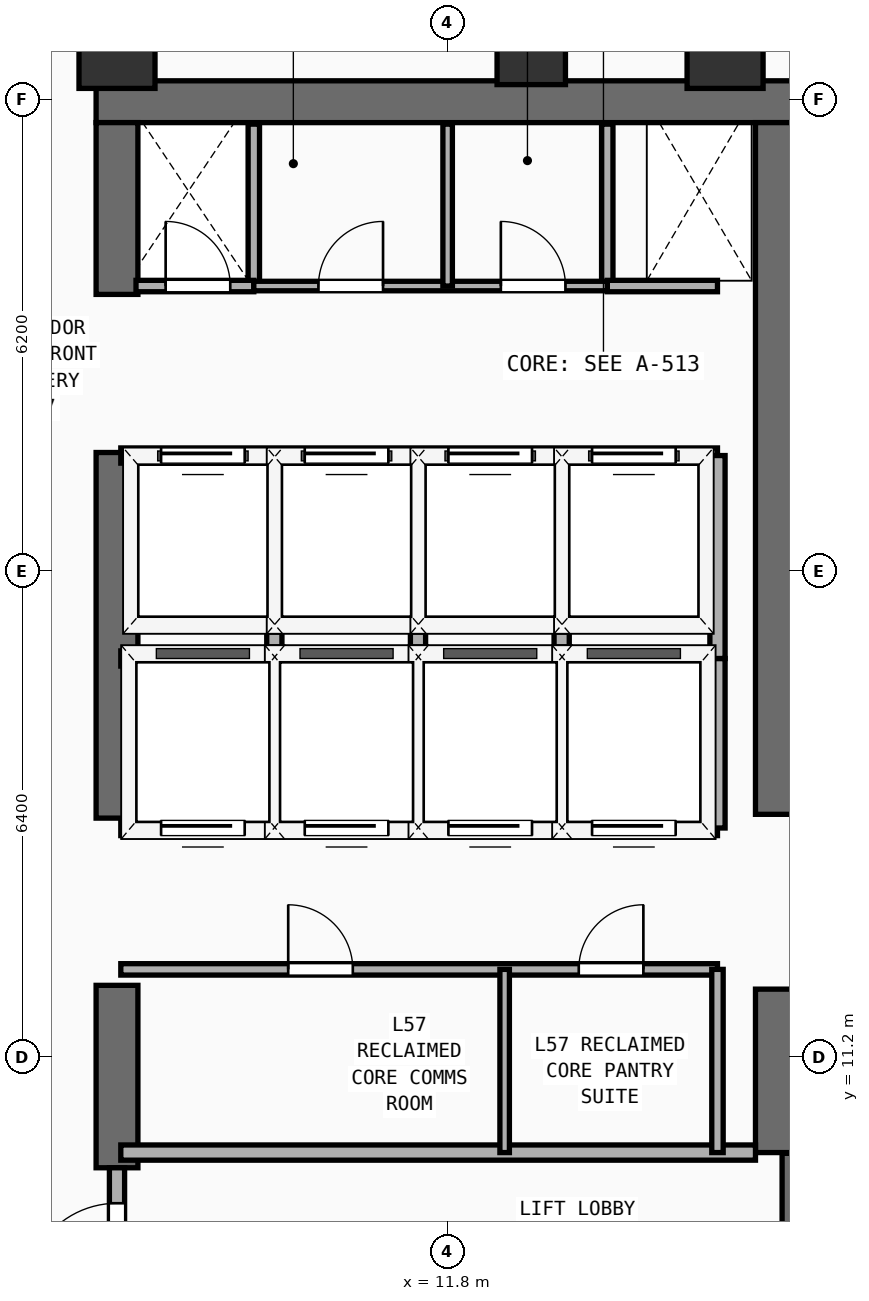
"""IFC4 building model, lengths in metres.
Left out: names, types, materials, properties, quantities, classifications, styles, units other than length and angle.
Written with IfcOpenShell. Run it as: python <this file> out.ifc"""

import sys

from ifc_helpers import new_model, si_unit, direction, frame, frame_2d, origin, origin_2d, place, context, subcontext, project, spatial, rectangle, extrude, element, fill, save


model = new_model("IFC4")
c1 = context("Model", 3, precision=1e-05, world=origin(), true_north=direction((0.0, 1.0)))
c2 = subcontext(c1, "Body", "Model", "MODEL_VIEW")
j1 = project(units=[si_unit("LENGTHUNIT", "METRE"), si_unit("PLANEANGLEUNIT", "RADIAN")], contexts=[c1])
p1 = place(None, origin())
s1 = spatial("IfcSite", under=j1, at=p1, CompositionType="ELEMENT")
p2 = place(p1, origin())
s2 = spatial("IfcBuilding", under=s1, at=p2, CompositionType="ELEMENT")
p3 = place(p2, frame((0.0, 0.0, 223.5)))
s3 = spatial("IfcBuildingStorey", under=s2, at=p3, CompositionType="ELEMENT", Elevation=223.5)
p4 = place(p3, frame((7.175, 23.775, 0.0), z_axis=(0.0, 0.0, 1.0), x_axis=(1.0, 0.0, 0.0)))
e1 = element("IfcWall", 1, at=p4, inside=s3, PredefinedType="SHEAR", context=c2, shape_type="SweptSolid", body=[
    extrude(rectangle(XDim=13.9, YDim=0.55, at=frame_2d((6.95, 0.0))), origin(), (0.0, 0.0, 1.0), 3.56),
])
p5 = place(p3, frame((7.45, 9.75, 0.0), z_axis=(0.0, 0.0, 1.0), x_axis=(0.0, 1.0, 0.0)))
e2 = element("IfcWall", 2, at=p5, inside=s3, PredefinedType="SHEAR", context=c2, shape_type="SweptSolid", body=[
    extrude(rectangle(XDim=2.4, YDim=0.55, at=frame_2d((1.2, 0.0))), origin(), (0.0, 0.0, 1.0), 3.56),
])
p6 = place(p3, frame((7.45, 14.35, 0.0), z_axis=(0.0, 0.0, 1.0), x_axis=(0.0, 1.0, 0.0)))
e3 = element("IfcWall", 3, at=p6, inside=s3, PredefinedType="SHEAR", context=c2, shape_type="SweptSolid", body=[
    extrude(rectangle(XDim=4.81, YDim=0.55, at=frame_2d((2.405, 0.0))), origin(), (0.0, 0.0, 1.0), 3.56),
])
p7 = place(p3, frame((7.45, 21.24, 0.0), z_axis=(0.0, 0.0, 1.0), x_axis=(0.0, 1.0, 0.0)))
e4 = element("IfcWall", 4, at=p7, inside=s3, PredefinedType="SHEAR", context=c2, shape_type="SweptSolid", body=[
    extrude(rectangle(XDim=2.26, YDim=0.55, at=frame_2d((1.13, 0.0))), origin(), (0.0, 0.0, 1.0), 3.56),
])
p8 = place(p3, frame((16.125, 9.95, 0.0), z_axis=(0.0, 0.0, 1.0), x_axis=(0.0, 1.0, 0.0)))
e5 = element("IfcWall", 5, at=p8, inside=s3, PredefinedType="SHEAR", context=c2, shape_type="SweptSolid", body=[
    extrude(rectangle(XDim=2.15, YDim=0.55, at=frame_2d((1.075, 0.0))), origin(), (0.0, 0.0, 1.0), 3.56),
])
p9 = place(p3, frame((16.125, 14.4, 0.0), z_axis=(0.0, 0.0, 1.0), x_axis=(0.0, 1.0, 0.0)))
e6 = element("IfcWall", 6, at=p9, inside=s3, PredefinedType="SHEAR", context=c2, shape_type="SweptSolid", body=[
    extrude(rectangle(XDim=9.1, YDim=0.55, at=frame_2d((4.55, 0.0))), origin(), (0.0, 0.0, 1.0), 3.56),
])
for number, where, z_axis, x_axis in (
    (7, (7.45, 24.45, 0.0), (0.0, 0.0, 1.0), (1.0, 0.0, 0.0)),
    (8, (15.45, 24.45, 0.0), (0.0, 0.0, 1.0), (1.0, 0.0, 0.0)),
):
    element("IfcColumn", number, at=place(p3, frame(where, z_axis=z_axis, x_axis=x_axis)), inside=s3, PredefinedType="COLUMN", context=c2, shape_type="SweptSolid", body=[
        extrude(rectangle(XDim=1.0, YDim=1.0, at=origin_2d()), origin(), (0.0, 0.0, 1.0), 3.56),
    ])
p10 = place(p3, frame((12.9, 24.45, 0.0), z_axis=(0.0, 0.0, 1.0), x_axis=(1.0, 0.0, 0.0)))
e9 = element("IfcColumn", 9, at=p10, inside=s3, PredefinedType="COLUMN", context=c2, shape_type="SweptSolid", body=[
    extrude(rectangle(XDim=0.9, YDim=0.9, at=origin_2d()), origin(), (0.0, 0.0, 1.0), 3.56),
])
p11 = place(p3, frame((16.3, 7.36, 0.0), z_axis=(0.0, 0.0, 1.0), x_axis=(0.0, 1.0, 0.0)))
e10 = element("IfcWall", 10, at=p11, inside=s3, PredefinedType="SHEAR", context=c2, shape_type="SweptSolid", body=[
    extrude(rectangle(XDim=2.58, YDim=0.2, at=frame_2d((1.29, 0.0))), origin(), (0.0, 0.0, 1.0), 3.56),
])
p12 = place(p3, frame((7.5, 9.95, 0.0), z_axis=(0.0, 0.0, 1.0), x_axis=(1.0, 0.0, 0.0)))
e11 = element("IfcWall", 11, at=p12, inside=s3, PredefinedType="PARTITIONING", context=c2, shape_type="SweptSolid", body=[
    extrude(rectangle(XDim=8.35, YDim=0.2, at=frame_2d((4.175, 0.0))), origin(), (0.0, 0.0, 1.0), 3.56),
])
p13 = place(p3, frame((7.45, 7.45, 0.0), z_axis=(0.0, 0.0, 1.0), x_axis=(0.0, 1.0, 0.0)))
e12 = element("IfcWall", 12, at=p13, inside=s3, PredefinedType="PARTITIONING", context=c2, shape_type="SweptSolid", body=[
    extrude(rectangle(XDim=2.3, YDim=0.2, at=frame_2d((1.15, 0.0))), origin(), (0.0, 0.0, 1.0), 2.54),
])
p14 = place(p13, frame((0.633, 0.0, 0.0)))
e13 = element("IfcOpeningElement", 13, at=p14, cuts=e12, PredefinedType="OPENING", context=c2, shape_type="SweptSolid", body=[
    extrude(rectangle(XDim=1.2, YDim=2.25, at=frame_2d((0.6, 1.125))), frame((0.0, 0.11, 0.0), z_axis=(0.0, -1.0, 0.0), x_axis=(1.0, 0.0, 0.0)), (0.0, 0.0, 1.0), 0.22),
])
p15 = place(p3, frame((7.5, 12.36, 0.0), z_axis=(0.0, 0.0, 1.0), x_axis=(1.0, 0.0, 0.0)))
e14 = element("IfcWall", 14, at=p15, inside=s3, PredefinedType="PARTITIONING", context=c2, shape_type="SweptSolid", body=[
    extrude(rectangle(XDim=7.85, YDim=0.15, at=frame_2d((3.925, 0.0))), origin(), (0.0, 0.0, 1.0), 3.56),
])
p16 = place(p15, frame((2.202, 0.0, 0.0)))
e15 = element("IfcOpeningElement", 15, at=p16, cuts=e14, PredefinedType="OPENING", context=c2, shape_type="SweptSolid", body=[
    extrude(rectangle(XDim=0.85, YDim=2.15, at=frame_2d((0.425, 1.075))), frame((0.0, 0.085, 0.0), z_axis=(0.0, -1.0, 0.0), x_axis=(1.0, 0.0, 0.0)), (0.0, 0.0, 1.0), 0.17),
])
p17 = place(p15, frame((6.025, 0.0, 0.0)))
e16 = element("IfcOpeningElement", 16, at=p17, cuts=e14, PredefinedType="OPENING", context=c2, shape_type="SweptSolid", body=[
    extrude(rectangle(XDim=0.85, YDim=2.15, at=frame_2d((0.425, 1.075))), frame((0.0, 0.085, 0.0), z_axis=(0.0, -1.0, 0.0), x_axis=(1.0, 0.0, 0.0)), (0.0, 0.0, 1.0), 0.17),
])
p18 = place(p3, frame((15.35, 9.95, 0.0), z_axis=(0.0, 0.0, 1.0), x_axis=(0.0, 1.0, 0.0)))
e17 = element("IfcWall", 17, at=p18, inside=s3, PredefinedType="PARTITIONING", context=c2, shape_type="SweptSolid", body=[
    extrude(rectangle(XDim=2.41, YDim=0.15, at=frame_2d((1.205, 0.0))), origin(), (0.0, 0.0, 1.0), 3.56),
])
p19 = place(p3, frame((12.55, 9.95, 0.0), z_axis=(0.0, 0.0, 1.0), x_axis=(0.0, 1.0, 0.0)))
e18 = element("IfcWall", 18, at=p19, inside=s3, PredefinedType="PARTITIONING", context=c2, shape_type="SweptSolid", body=[
    extrude(rectangle(XDim=2.41, YDim=0.125, at=frame_2d((1.205, 0.0))), origin(), (0.0, 0.0, 1.0), 3.56),
])
p20 = place(p3, frame((7.5, 14.22, 0.0), z_axis=(0.0, 0.0, 1.0), x_axis=(1.0, 0.0, 0.0)))
e19 = element("IfcWall", 19, at=p20, inside=s3, PredefinedType="PARTITIONING", context=c2, shape_type="SweptSolid", body=[
    extrude(rectangle(XDim=7.85, YDim=0.2, at=frame_2d((3.925, 0.0))), origin(), (0.0, 0.0, 1.0), 3.56),
])
p21 = place(p20, frame((0.53, 0.0, 0.0)))
e20 = element("IfcOpeningElement", 20, at=p21, cuts=e19, PredefinedType="OPENING", context=c2, shape_type="SweptSolid", body=[
    extrude(rectangle(XDim=1.1, YDim=2.2, at=frame_2d((0.55, 1.1))), frame((0.0, 0.11, 0.0), z_axis=(0.0, -1.0, 0.0), x_axis=(1.0, 0.0, 0.0)), (0.0, 0.0, 1.0), 0.22),
])
p22 = place(p20, frame((2.42, 0.0, 0.0)))
e21 = element("IfcOpeningElement", 21, at=p22, cuts=e19, PredefinedType="OPENING", context=c2, shape_type="SweptSolid", body=[
    extrude(rectangle(XDim=1.1, YDim=2.2, at=frame_2d((0.55, 1.1))), frame((0.0, 0.11, 0.0), z_axis=(0.0, -1.0, 0.0), x_axis=(1.0, 0.0, 0.0)), (0.0, 0.0, 1.0), 0.22),
])
p23 = place(p20, frame((4.31, 0.0, 0.0)))
e22 = element("IfcOpeningElement", 22, at=p23, cuts=e19, PredefinedType="OPENING", context=c2, shape_type="SweptSolid", body=[
    extrude(rectangle(XDim=1.1, YDim=2.2, at=frame_2d((0.55, 1.1))), frame((0.0, 0.11, 0.0), z_axis=(0.0, -1.0, 0.0), x_axis=(1.0, 0.0, 0.0)), (0.0, 0.0, 1.0), 0.22),
])
p24 = place(p20, frame((6.2, 0.0, 0.0)))
e23 = element("IfcOpeningElement", 23, at=p24, cuts=e19, PredefinedType="OPENING", context=c2, shape_type="SweptSolid", body=[
    extrude(rectangle(XDim=1.1, YDim=2.2, at=frame_2d((0.55, 1.1))), frame((0.0, 0.11, 0.0), z_axis=(0.0, -1.0, 0.0), x_axis=(1.0, 0.0, 0.0)), (0.0, 0.0, 1.0), 0.22),
])
p25 = place(p3, frame((7.5, 16.45, 0.0), z_axis=(0.0, 0.0, 1.0), x_axis=(1.0, 0.0, 0.0)))
e24 = element("IfcWall", 24, at=p25, inside=s3, PredefinedType="PARTITIONING", context=c2, shape_type="SweptSolid", body=[
    extrude(rectangle(XDim=7.85, YDim=0.2, at=frame_2d((3.925, 0.0))), origin(), (0.0, 0.0, 1.0), 3.56),
])
for number, where, z_axis, x_axis in (
    (25, (15.35, 14.22, 0.0), (0.0, 0.0, 1.0), (0.0, 1.0, 0.0)),
    (26, (9.52, 14.22, 0.0), (0.0, 0.0, 1.0), (0.0, 1.0, 0.0)),
    (27, (11.41, 14.22, 0.0), (0.0, 0.0, 1.0), (0.0, 1.0, 0.0)),
    (28, (13.3, 14.22, 0.0), (0.0, 0.0, 1.0), (0.0, 1.0, 0.0)),
):
    element("IfcWall", number, at=place(p3, frame(where, z_axis=z_axis, x_axis=x_axis)), inside=s3, PredefinedType="PARTITIONING", context=c2, shape_type="SweptSolid", body=[
        extrude(rectangle(XDim=2.23, YDim=0.2, at=frame_2d((1.115, 0.0))), origin(), (0.0, 0.0, 1.0), 3.56),
    ])
p26 = place(p3, frame((7.5, 19.12, 0.0), z_axis=(0.0, 0.0, 1.0), x_axis=(1.0, 0.0, 0.0)))
e29 = element("IfcWall", 29, at=p26, inside=s3, PredefinedType="PARTITIONING", context=c2, shape_type="SweptSolid", body=[
    extrude(rectangle(XDim=7.85, YDim=0.2, at=frame_2d((3.925, 0.0))), origin(), (0.0, 0.0, 1.0), 3.56),
])
p27 = place(p26, frame((0.53, 0.0, 0.0)))
e30 = element("IfcOpeningElement", 30, at=p27, cuts=e29, PredefinedType="OPENING", context=c2, shape_type="SweptSolid", body=[
    extrude(rectangle(XDim=1.1, YDim=2.2, at=frame_2d((0.55, 1.1))), frame((0.0, 0.11, 0.0), z_axis=(0.0, -1.0, 0.0), x_axis=(1.0, 0.0, 0.0)), (0.0, 0.0, 1.0), 0.22),
])
p28 = place(p26, frame((2.42, 0.0, 0.0)))
e31 = element("IfcOpeningElement", 31, at=p28, cuts=e29, PredefinedType="OPENING", context=c2, shape_type="SweptSolid", body=[
    extrude(rectangle(XDim=1.1, YDim=2.2, at=frame_2d((0.55, 1.1))), frame((0.0, 0.11, 0.0), z_axis=(0.0, -1.0, 0.0), x_axis=(1.0, 0.0, 0.0)), (0.0, 0.0, 1.0), 0.22),
])
p29 = place(p26, frame((4.31, 0.0, 0.0)))
e32 = element("IfcOpeningElement", 32, at=p29, cuts=e29, PredefinedType="OPENING", context=c2, shape_type="SweptSolid", body=[
    extrude(rectangle(XDim=1.1, YDim=2.2, at=frame_2d((0.55, 1.1))), frame((0.0, 0.11, 0.0), z_axis=(0.0, -1.0, 0.0), x_axis=(1.0, 0.0, 0.0)), (0.0, 0.0, 1.0), 0.22),
])
p30 = place(p26, frame((6.2, 0.0, 0.0)))
e33 = element("IfcOpeningElement", 33, at=p30, cuts=e29, PredefinedType="OPENING", context=c2, shape_type="SweptSolid", body=[
    extrude(rectangle(XDim=1.1, YDim=2.2, at=frame_2d((0.55, 1.1))), frame((0.0, 0.11, 0.0), z_axis=(0.0, -1.0, 0.0), x_axis=(1.0, 0.0, 0.0)), (0.0, 0.0, 1.0), 0.22),
])
for number, where, z_axis, x_axis in (
    (34, (15.35, 16.45, 0.0), (0.0, 0.0, 1.0), (0.0, 1.0, 0.0)),
    (35, (9.52, 16.45, 0.0), (0.0, 0.0, 1.0), (0.0, 1.0, 0.0)),
    (36, (11.41, 16.45, 0.0), (0.0, 0.0, 1.0), (0.0, 1.0, 0.0)),
    (37, (13.3, 16.45, 0.0), (0.0, 0.0, 1.0), (0.0, 1.0, 0.0)),
):
    element("IfcWall", number, at=place(p3, frame(where, z_axis=z_axis, x_axis=x_axis)), inside=s3, PredefinedType="PARTITIONING", context=c2, shape_type="SweptSolid", body=[
        extrude(rectangle(XDim=2.67, YDim=0.2, at=frame_2d((1.335, 0.0))), origin(), (0.0, 0.0, 1.0), 3.56),
    ])
for number, where, z_axis, x_axis in (
    (38, (9.25, 21.35, 0.0), (0.0, 0.0, 1.0), (0.0, 1.0, 0.0)),
    (39, (13.9, 21.35, 0.0), (0.0, 0.0, 1.0), (0.0, 1.0, 0.0)),
):
    element("IfcWall", number, at=place(p3, frame(where, z_axis=z_axis, x_axis=x_axis)), inside=s3, PredefinedType="PARTITIONING", context=c2, shape_type="SweptSolid", body=[
        extrude(rectangle(XDim=2.13, YDim=0.15, at=frame_2d((1.065, 0.0))), origin(), (0.0, 0.0, 1.0), 3.56),
    ])
p31 = place(p3, frame((7.7, 21.35, 0.0), z_axis=(0.0, 0.0, 1.0), x_axis=(1.0, 0.0, 0.0)))
e40 = element("IfcWall", 40, at=p31, inside=s3, PredefinedType="PARTITIONING", context=c2, shape_type="SweptSolid", body=[
    extrude(rectangle(XDim=1.55, YDim=0.15, at=frame_2d((0.775, 0.0))), origin(), (0.0, 0.0, 1.0), 3.56),
])
p32 = place(p31, frame((0.39, 0.0, 0.0)))
e41 = element("IfcOpeningElement", 41, at=p32, cuts=e40, PredefinedType="OPENING", context=c2, shape_type="SweptSolid", body=[
    extrude(rectangle(XDim=0.85, YDim=2.15, at=frame_2d((0.425, 1.075))), frame((0.0, 0.085, 0.0), z_axis=(0.0, -1.0, 0.0), x_axis=(1.0, 0.0, 0.0)), (0.0, 0.0, 1.0), 0.17),
])
p33 = place(p3, frame((13.9, 21.35, 0.0), z_axis=(0.0, 0.0, 1.0), x_axis=(1.0, 0.0, 0.0)))
e42 = element("IfcWall", 42, at=p33, inside=s3, PredefinedType="PARTITIONING", context=c2, shape_type="SweptSolid", body=[
    extrude(rectangle(XDim=1.45, YDim=0.15, at=frame_2d((0.725, 0.0))), origin(), (0.0, 0.0, 1.0), 3.56),
])
p34 = place(p3, frame((9.25, 21.35, 0.0), z_axis=(0.0, 0.0, 1.0), x_axis=(1.0, 0.0, 0.0)))
e43 = element("IfcWall", 43, at=p34, inside=s3, PredefinedType="PARTITIONING", context=c2, shape_type="SweptSolid", body=[
    extrude(rectangle(XDim=4.65, YDim=0.125, at=frame_2d((2.325, 0.0))), origin(), (0.0, 0.0, 1.0), 3.56),
])
p35 = place(p34, frame((0.85, 0.0, 0.0)))
e44 = element("IfcOpeningElement", 44, at=p35, cuts=e43, PredefinedType="OPENING", context=c2, shape_type="SweptSolid", body=[
    extrude(rectangle(XDim=0.85, YDim=2.15, at=frame_2d((0.425, 1.075))), frame((0.0, 0.073, 0.0), z_axis=(0.0, -1.0, 0.0), x_axis=(1.0, 0.0, 0.0)), (0.0, 0.0, 1.0), 0.145),
])
p36 = place(p34, frame((3.25, 0.0, 0.0)))
e45 = element("IfcOpeningElement", 45, at=p36, cuts=e43, PredefinedType="OPENING", context=c2, shape_type="SweptSolid", body=[
    extrude(rectangle(XDim=0.85, YDim=2.15, at=frame_2d((0.425, 1.075))), frame((0.0, 0.073, 0.0), z_axis=(0.0, -1.0, 0.0), x_axis=(1.0, 0.0, 0.0)), (0.0, 0.0, 1.0), 0.145),
])
p37 = place(p3, frame((11.8, 21.35, 0.0), z_axis=(0.0, 0.0, 1.0), x_axis=(0.0, 1.0, 0.0)))
e46 = element("IfcWall", 46, at=p37, inside=s3, PredefinedType="PARTITIONING", context=c2, shape_type="SweptSolid", body=[
    extrude(rectangle(XDim=2.13, YDim=0.125, at=frame_2d((1.065, 0.0))), origin(), (0.0, 0.0, 1.0), 3.56),
])
p38 = place(p14, frame((1.2, 0.0, 0.0), z_axis=(0.0, 0.0, 1.0), x_axis=(-1.0, 0.0, 0.0)))
e47 = element("IfcDoor", 47, at=p38, inside=s3, OperationType="SINGLE_SWING_RIGHT", PredefinedType="DOOR", context=c2, shape_type="SweptSolid", body=[
    extrude(rectangle(XDim=1.2, YDim=2.25, at=frame_2d((0.6, 1.125))), frame((0.0, 0.025, 0.0), z_axis=(0.0, -1.0, 0.0), x_axis=(1.0, 0.0, 0.0)), (0.0, 0.0, 1.0), 0.05),
])
fill(e13, e47)
p39 = place(p16, origin())
e48 = element("IfcDoor", 48, at=p39, inside=s3, OperationType="SINGLE_SWING_LEFT", PredefinedType="DOOR", context=c2, shape_type="SweptSolid", body=[
    extrude(rectangle(XDim=0.85, YDim=2.15, at=frame_2d((0.425, 1.075))), frame((0.0, 0.025, 0.0), z_axis=(0.0, -1.0, 0.0), x_axis=(1.0, 0.0, 0.0)), (0.0, 0.0, 1.0), 0.05),
])
fill(e15, e48)
p40 = place(p17, origin())
e49 = element("IfcDoor", 49, at=p40, inside=s3, OperationType="SINGLE_SWING_RIGHT", PredefinedType="DOOR", context=c2, shape_type="SweptSolid", body=[
    extrude(rectangle(XDim=0.85, YDim=2.15, at=frame_2d((0.425, 1.075))), frame((0.0, 0.025, 0.0), z_axis=(0.0, -1.0, 0.0), x_axis=(1.0, 0.0, 0.0)), (0.0, 0.0, 1.0), 0.05),
])
fill(e16, e49)
p41 = place(p21, frame((1.1, 0.0, 0.0), z_axis=(0.0, 0.0, 1.0), x_axis=(-1.0, 0.0, 0.0)))
e50 = element("IfcDoor", 50, at=p41, inside=s3, OperationType="SLIDING_TO_LEFT", PredefinedType="DOOR", context=c2, shape_type="SweptSolid", body=[
    extrude(rectangle(XDim=1.1, YDim=2.2, at=frame_2d((0.55, 1.1))), frame((0.0, 0.025, 0.0), z_axis=(0.0, -1.0, 0.0), x_axis=(1.0, 0.0, 0.0)), (0.0, 0.0, 1.0), 0.05),
])
fill(e20, e50)
p42 = place(p22, frame((1.1, 0.0, 0.0), z_axis=(0.0, 0.0, 1.0), x_axis=(-1.0, 0.0, 0.0)))
e51 = element("IfcDoor", 51, at=p42, inside=s3, OperationType="SLIDING_TO_LEFT", PredefinedType="DOOR", context=c2, shape_type="SweptSolid", body=[
    extrude(rectangle(XDim=1.1, YDim=2.2, at=frame_2d((0.55, 1.1))), frame((0.0, 0.025, 0.0), z_axis=(0.0, -1.0, 0.0), x_axis=(1.0, 0.0, 0.0)), (0.0, 0.0, 1.0), 0.05),
])
fill(e21, e51)
p43 = place(p23, frame((1.1, 0.0, 0.0), z_axis=(0.0, 0.0, 1.0), x_axis=(-1.0, 0.0, 0.0)))
e52 = element("IfcDoor", 52, at=p43, inside=s3, OperationType="SLIDING_TO_LEFT", PredefinedType="DOOR", context=c2, shape_type="SweptSolid", body=[
    extrude(rectangle(XDim=1.1, YDim=2.2, at=frame_2d((0.55, 1.1))), frame((0.0, 0.025, 0.0), z_axis=(0.0, -1.0, 0.0), x_axis=(1.0, 0.0, 0.0)), (0.0, 0.0, 1.0), 0.05),
])
fill(e22, e52)
p44 = place(p24, frame((1.1, 0.0, 0.0), z_axis=(0.0, 0.0, 1.0), x_axis=(-1.0, 0.0, 0.0)))
e53 = element("IfcDoor", 53, at=p44, inside=s3, OperationType="SLIDING_TO_LEFT", PredefinedType="DOOR", context=c2, shape_type="SweptSolid", body=[
    extrude(rectangle(XDim=1.1, YDim=2.2, at=frame_2d((0.55, 1.1))), frame((0.0, 0.025, 0.0), z_axis=(0.0, -1.0, 0.0), x_axis=(1.0, 0.0, 0.0)), (0.0, 0.0, 1.0), 0.05),
])
fill(e23, e53)
p45 = place(p27, origin())
e54 = element("IfcDoor", 54, at=p45, inside=s3, OperationType="SLIDING_TO_LEFT", PredefinedType="DOOR", context=c2, shape_type="SweptSolid", body=[
    extrude(rectangle(XDim=1.1, YDim=2.2, at=frame_2d((0.55, 1.1))), frame((0.0, 0.025, 0.0), z_axis=(0.0, -1.0, 0.0), x_axis=(1.0, 0.0, 0.0)), (0.0, 0.0, 1.0), 0.05),
])
fill(e30, e54)
p46 = place(p28, origin())
e55 = element("IfcDoor", 55, at=p46, inside=s3, OperationType="SLIDING_TO_LEFT", PredefinedType="DOOR", context=c2, shape_type="SweptSolid", body=[
    extrude(rectangle(XDim=1.1, YDim=2.2, at=frame_2d((0.55, 1.1))), frame((0.0, 0.025, 0.0), z_axis=(0.0, -1.0, 0.0), x_axis=(1.0, 0.0, 0.0)), (0.0, 0.0, 1.0), 0.05),
])
fill(e31, e55)
p47 = place(p29, origin())
e56 = element("IfcDoor", 56, at=p47, inside=s3, OperationType="SLIDING_TO_LEFT", PredefinedType="DOOR", context=c2, shape_type="SweptSolid", body=[
    extrude(rectangle(XDim=1.1, YDim=2.2, at=frame_2d((0.55, 1.1))), frame((0.0, 0.025, 0.0), z_axis=(0.0, -1.0, 0.0), x_axis=(1.0, 0.0, 0.0)), (0.0, 0.0, 1.0), 0.05),
])
fill(e32, e56)
p48 = place(p30, origin())
e57 = element("IfcDoor", 57, at=p48, inside=s3, OperationType="SLIDING_TO_LEFT", PredefinedType="DOOR", context=c2, shape_type="SweptSolid", body=[
    extrude(rectangle(XDim=1.1, YDim=2.2, at=frame_2d((0.55, 1.1))), frame((0.0, 0.025, 0.0), z_axis=(0.0, -1.0, 0.0), x_axis=(1.0, 0.0, 0.0)), (0.0, 0.0, 1.0), 0.05),
])
fill(e33, e57)
p49 = place(p32, origin())
e58 = element("IfcDoor", 58, at=p49, inside=s3, OperationType="SINGLE_SWING_LEFT", PredefinedType="DOOR", context=c2, shape_type="SweptSolid", body=[
    extrude(rectangle(XDim=0.85, YDim=2.15, at=frame_2d((0.425, 1.075))), frame((0.0, 0.025, 0.0), z_axis=(0.0, -1.0, 0.0), x_axis=(1.0, 0.0, 0.0)), (0.0, 0.0, 1.0), 0.05),
])
fill(e41, e58)
p50 = place(p35, origin())
e59 = element("IfcDoor", 59, at=p50, inside=s3, OperationType="SINGLE_SWING_RIGHT", PredefinedType="DOOR", context=c2, shape_type="SweptSolid", body=[
    extrude(rectangle(XDim=0.85, YDim=2.15, at=frame_2d((0.425, 1.075))), frame((0.0, 0.025, 0.0), z_axis=(0.0, -1.0, 0.0), x_axis=(1.0, 0.0, 0.0)), (0.0, 0.0, 1.0), 0.05),
])
fill(e44, e59)
p51 = place(p36, origin())
e60 = element("IfcDoor", 60, at=p51, inside=s3, OperationType="SINGLE_SWING_LEFT", PredefinedType="DOOR", context=c2, shape_type="SweptSolid", body=[
    extrude(rectangle(XDim=0.85, YDim=2.15, at=frame_2d((0.425, 1.075))), frame((0.0, 0.025, 0.0), z_axis=(0.0, -1.0, 0.0), x_axis=(1.0, 0.0, 0.0)), (0.0, 0.0, 1.0), 0.05),
])
fill(e45, e60)
save(model, sys.argv[1])
